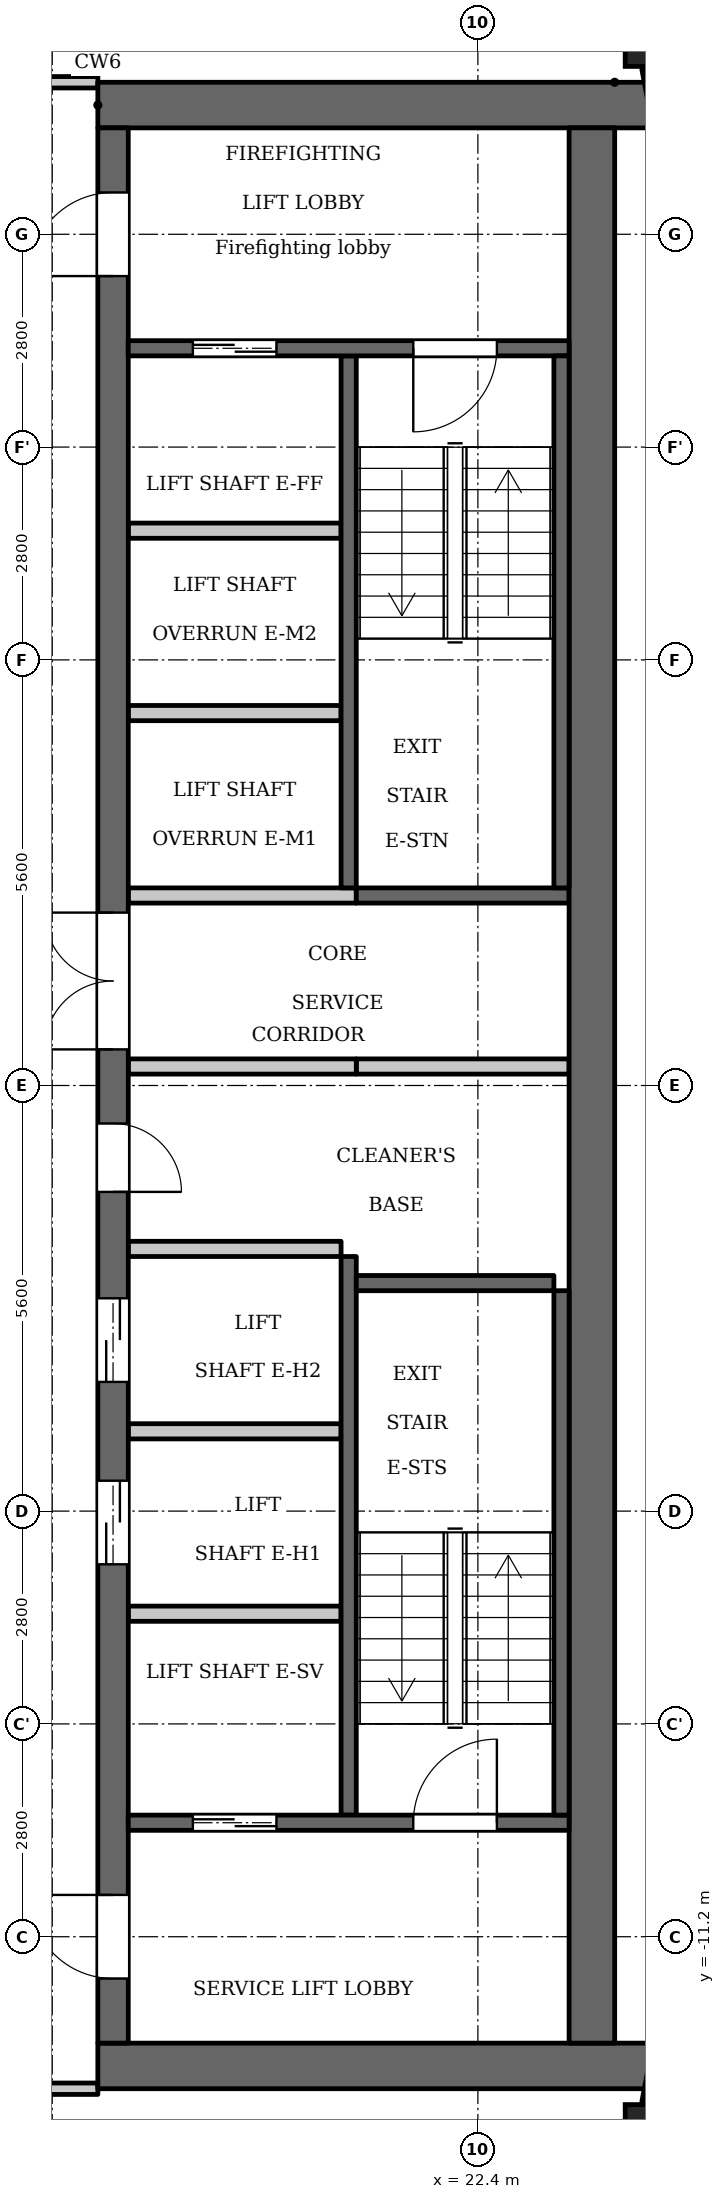
"""IFC4 building model, lengths in metres.
Left out: names, types, materials, properties, quantities, classifications, styles, units other than length and angle.
Written with IfcOpenShell. Run it as: python <this file> out.ifc"""

import sys

from ifc_helpers import new_model, si_unit, direction, frame, frame_2d, origin, origin_2d, place, context, subcontext, project, spatial, rectangle, extrude, element, fill, save


model = new_model("IFC4")
c1 = context("Model", 3, precision=1e-05, world=origin(), true_north=direction((0.0, 1.0)))
c2 = subcontext(c1, "Body", "Model", "MODEL_VIEW")
j1 = project(units=[si_unit("LENGTHUNIT", "METRE"), si_unit("PLANEANGLEUNIT", "RADIAN")], contexts=[c1])
p1 = place(None, origin())
s1 = spatial("IfcSite", under=j1, at=p1, CompositionType="ELEMENT")
p2 = place(p1, origin())
s2 = spatial("IfcBuilding", under=s1, at=p2, CompositionType="ELEMENT")
p3 = place(p2, frame((0.0, 0.0, 245.2)))
s3 = spatial("IfcBuildingStorey", under=s2, at=p3, CompositionType="ELEMENT", Elevation=245.2)
for number, where, z_axis, x_axis in (
    (1, (24.738, -13.809, 0.0), (0.0, 0.0, 1.0), (1.0, 0.0, 0.0)),
    (2, (24.738, 13.809, 0.0), (0.0, 0.0, 1.0), (1.0, 0.0, 0.0)),
):
    element("IfcColumn", number, at=place(p3, frame(where, z_axis=z_axis, x_axis=x_axis)), inside=s3, PredefinedType="COLUMN", context=c2, shape_type="SweptSolid", body=[
        extrude(rectangle(XDim=0.8, YDim=0.8, at=origin_2d()), origin(), (0.0, 0.0, 1.0), 3.5),
    ])
for number, where, z_axis, x_axis in (
    (3, (24.705, -13.395, 0.0), (0.0, 0.0, 1.0), (0.187, 0.982, 0.0)),
    (4, (25.053, 11.572, 0.0), (0.0, 0.0, 1.0), (-0.187, 0.982, 0.0)),
):
    element("IfcWall", number, at=place(p3, frame(where, z_axis=z_axis, x_axis=x_axis)), inside=s3, PredefinedType="SOLIDWALL", context=c2, shape_type="SweptSolid", body=[
        extrude(rectangle(XDim=1.856, YDim=0.3, at=frame_2d((0.928, 0.0))), origin(), (0.0, 0.0, 1.0), 2.55),
    ])
p4 = place(p3, frame((20.7, 2.6, 0.0), z_axis=(0.0, 0.0, 1.0), x_axis=(0.0, 1.0, 0.0)))
e5 = element("IfcWall", 5, at=p4, inside=s3, PredefinedType="SHEAR", context=c2, shape_type="SweptSolid", body=[
    extrude(rectangle(XDim=7.0, YDim=0.2, at=frame_2d((3.5, 0.0))), origin(), (0.0, 0.0, 1.0), 3.2),
])
p5 = place(p3, frame((20.7, -9.6, 0.0), z_axis=(0.0, 0.0, 1.0), x_axis=(0.0, 1.0, 0.0)))
e6 = element("IfcWall", 6, at=p5, inside=s3, PredefinedType="SHEAR", context=c2, shape_type="SweptSolid", body=[
    extrude(rectangle(XDim=7.35, YDim=0.2, at=frame_2d((3.675, 0.0))), origin(), (0.0, 0.0, 1.0), 3.2),
])
p6 = place(p3, frame((20.8, 2.5, 0.0), z_axis=(0.0, 0.0, 1.0), x_axis=(1.0, 0.0, 0.0)))
e7 = element("IfcWall", 7, at=p6, inside=s3, PredefinedType="SHEAR", context=c2, shape_type="SweptSolid", body=[
    extrude(rectangle(XDim=2.8, YDim=0.2, at=frame_2d((1.4, 0.0))), origin(), (0.0, 0.0, 1.0), 3.2),
])
p7 = place(p3, frame((20.8, 0.25, 0.0), z_axis=(0.0, 0.0, 1.0), x_axis=(1.0, 0.0, 0.0)))
e8 = element("IfcWall", 8, at=p7, inside=s3, PredefinedType="PARTITIONING", context=c2, shape_type="SweptSolid", body=[
    extrude(rectangle(XDim=2.8, YDim=0.2, at=frame_2d((1.4, 0.0))), origin(), (0.0, 0.0, 1.0), 3.2),
])
for number, where, z_axis, x_axis in (
    (9, (17.4, 12.9, 0.0), (0.0, 0.0, 1.0), (1.0, 0.0, 0.0)),
    (10, (17.4, -12.9, 0.0), (0.0, 0.0, 1.0), (1.0, 0.0, 0.0)),
):
    element("IfcWall", number, at=place(p3, frame(where, z_axis=z_axis, x_axis=x_axis)), inside=s3, PredefinedType="SHEAR", context=c2, shape_type="SweptSolid", body=[
        extrude(rectangle(XDim=7.32, YDim=0.6, at=frame_2d((3.66, 0.0))), origin(), (0.0, 0.0, 1.0), 3.2),
    ])
p8 = place(p3, frame((17.6, -12.6, 0.0), z_axis=(0.0, 0.0, 1.0), x_axis=(0.0, 1.0, 0.0)))
e11 = element("IfcWall", 11, at=p8, inside=s3, PredefinedType="SHEAR", context=c2, shape_type="SweptSolid", body=[
    extrude(rectangle(XDim=25.2, YDim=0.4, at=frame_2d((12.6, 0.0))), origin(), (0.0, 0.0, 1.0), 3.2),
])
p9 = place(p8, frame((6.3, 0.0, 0.0)))
e12 = element("IfcOpeningElement", 12, at=p9, cuts=e11, PredefinedType="OPENING", context=c2, shape_type="SweptSolid", body=[
    extrude(rectangle(XDim=1.1, YDim=2.1, at=frame_2d((0.55, 1.05))), frame((0.0, 0.21, 0.0), z_axis=(0.0, -1.0, 0.0), x_axis=(1.0, 0.0, 0.0)), (0.0, 0.0, 1.0), 0.42),
])
p10 = place(p8, frame((8.7, 0.0, 0.0)))
e13 = element("IfcOpeningElement", 13, at=p10, cuts=e11, PredefinedType="OPENING", context=c2, shape_type="SweptSolid", body=[
    extrude(rectangle(XDim=1.1, YDim=2.1, at=frame_2d((0.55, 1.05))), frame((0.0, 0.21, 0.0), z_axis=(0.0, -1.0, 0.0), x_axis=(1.0, 0.0, 0.0)), (0.0, 0.0, 1.0), 0.42),
])
p11 = place(p8, frame((11.2, 0.0, 0.0)))
e14 = element("IfcOpeningElement", 14, at=p11, cuts=e11, PredefinedType="OPENING", context=c2, shape_type="SweptSolid", body=[
    extrude(rectangle(XDim=0.9, YDim=2.1, at=frame_2d((0.45, 1.05))), frame((0.0, 0.21, 0.0), z_axis=(0.0, -1.0, 0.0), x_axis=(1.0, 0.0, 0.0)), (0.0, 0.0, 1.0), 0.42),
])
p12 = place(p8, frame((23.25, 0.0, 0.0)))
e15 = element("IfcOpeningElement", 15, at=p12, cuts=e11, PredefinedType="OPENING", context=c2, shape_type="SweptSolid", body=[
    extrude(rectangle(XDim=1.1, YDim=2.1, at=frame_2d((0.55, 1.05))), frame((0.0, 0.21, 0.0), z_axis=(0.0, -1.0, 0.0), x_axis=(1.0, 0.0, 0.0)), (0.0, 0.0, 1.0), 0.42),
])
p13 = place(p8, frame((0.85, 0.0, 0.0)))
e16 = element("IfcOpeningElement", 16, at=p13, cuts=e11, PredefinedType="OPENING", context=c2, shape_type="SweptSolid", body=[
    extrude(rectangle(XDim=1.1, YDim=2.1, at=frame_2d((0.55, 1.05))), frame((0.0, 0.21, 0.0), z_axis=(0.0, -1.0, 0.0), x_axis=(1.0, 0.0, 0.0)), (0.0, 0.0, 1.0), 0.42),
])
p14 = place(p8, frame((13.075, 0.0, 0.0)))
e17 = element("IfcOpeningElement", 17, at=p14, cuts=e11, PredefinedType="OPENING", context=c2, shape_type="SweptSolid", body=[
    extrude(rectangle(XDim=1.8, YDim=2.1, at=frame_2d((0.9, 1.05))), frame((0.0, 0.21, 0.0), z_axis=(0.0, -1.0, 0.0), x_axis=(1.0, 0.0, 0.0)), (0.0, 0.0, 1.0), 0.42),
])
p15 = place(p3, frame((23.9, -12.6, 0.0), z_axis=(0.0, 0.0, 1.0), x_axis=(0.0, 1.0, 0.0)))
e18 = element("IfcWall", 18, at=p15, inside=s3, PredefinedType="SHEAR", context=c2, shape_type="SweptSolid", body=[
    extrude(rectangle(XDim=25.2, YDim=0.6, at=frame_2d((12.6, 0.0))), origin(), (0.0, 0.0, 1.0), 3.2),
])
p16 = place(p3, frame((17.8, -9.7, 0.0), z_axis=(0.0, 0.0, 1.0), x_axis=(1.0, 0.0, 0.0)))
e19 = element("IfcWall", 19, at=p16, inside=s3, PredefinedType="SHEAR", context=c2, shape_type="SweptSolid", body=[
    extrude(rectangle(XDim=5.8, YDim=0.2, at=frame_2d((2.9, 0.0))), origin(), (0.0, 0.0, 1.0), 3.2),
])
p17 = place(p16, frame((0.85, 0.0, 0.0)))
e20 = element("IfcOpeningElement", 20, at=p17, cuts=e19, PredefinedType="OPENING", context=c2, shape_type="SweptSolid", body=[
    extrude(rectangle(XDim=1.1, YDim=2.1, at=frame_2d((0.55, 1.05))), frame((0.0, 0.11, 0.0), z_axis=(0.0, -1.0, 0.0), x_axis=(1.0, 0.0, 0.0)), (0.0, 0.0, 1.0), 0.22),
])
p18 = place(p16, frame((3.75, 0.0, 0.0)))
e21 = element("IfcOpeningElement", 21, at=p18, cuts=e19, PredefinedType="OPENING", context=c2, shape_type="SweptSolid", body=[
    extrude(rectangle(XDim=1.1, YDim=2.1, at=frame_2d((0.55, 1.05))), frame((0.0, 0.11, 0.0), z_axis=(0.0, -1.0, 0.0), x_axis=(1.0, 0.0, 0.0)), (0.0, 0.0, 1.0), 0.22),
])
for number, where, z_axis, x_axis in (
    (22, (17.8, -6.95, 0.0), (0.0, 0.0, 1.0), (1.0, 0.0, 0.0)),
    (23, (17.8, -4.55, 0.0), (0.0, 0.0, 1.0), (1.0, 0.0, 0.0)),
    (24, (17.8, -2.15, 0.0), (0.0, 0.0, 1.0), (1.0, 0.0, 0.0)),
):
    element("IfcWall", number, at=place(p3, frame(where, z_axis=z_axis, x_axis=x_axis)), inside=s3, PredefinedType="PARTITIONING", context=c2, shape_type="SweptSolid", body=[
        extrude(rectangle(XDim=2.8, YDim=0.2, at=frame_2d((1.4, 0.0))), origin(), (0.0, 0.0, 1.0), 3.2),
    ])
for number, where, z_axis, x_axis in (
    (25, (17.8, 0.25, 0.0), (0.0, 0.0, 1.0), (1.0, 0.0, 0.0)),
    (26, (17.8, 2.5, 0.0), (0.0, 0.0, 1.0), (1.0, 0.0, 0.0)),
):
    element("IfcWall", number, at=place(p3, frame(where, z_axis=z_axis, x_axis=x_axis)), inside=s3, PredefinedType="PARTITIONING", context=c2, shape_type="SweptSolid", body=[
        extrude(rectangle(XDim=3.0, YDim=0.2, at=frame_2d((1.5, 0.0))), origin(), (0.0, 0.0, 1.0), 3.2),
    ])
for number, where, z_axis, x_axis in (
    (27, (17.8, 4.9, 0.0), (0.0, 0.0, 1.0), (1.0, 0.0, 0.0)),
    (28, (17.8, 7.3, 0.0), (0.0, 0.0, 1.0), (1.0, 0.0, 0.0)),
):
    element("IfcWall", number, at=place(p3, frame(where, z_axis=z_axis, x_axis=x_axis)), inside=s3, PredefinedType="PARTITIONING", context=c2, shape_type="SweptSolid", body=[
        extrude(rectangle(XDim=2.8, YDim=0.2, at=frame_2d((1.4, 0.0))), origin(), (0.0, 0.0, 1.0), 3.2),
    ])
p19 = place(p3, frame((17.8, 9.7, 0.0), z_axis=(0.0, 0.0, 1.0), x_axis=(1.0, 0.0, 0.0)))
e29 = element("IfcWall", 29, at=p19, inside=s3, PredefinedType="SHEAR", context=c2, shape_type="SweptSolid", body=[
    extrude(rectangle(XDim=5.8, YDim=0.2, at=frame_2d((2.9, 0.0))), origin(), (0.0, 0.0, 1.0), 3.2),
])
p20 = place(p19, frame((0.85, 0.0, 0.0)))
e30 = element("IfcOpeningElement", 30, at=p20, cuts=e29, PredefinedType="OPENING", context=c2, shape_type="SweptSolid", body=[
    extrude(rectangle(XDim=1.1, YDim=2.1, at=frame_2d((0.55, 1.05))), frame((0.0, 0.11, 0.0), z_axis=(0.0, -1.0, 0.0), x_axis=(1.0, 0.0, 0.0)), (0.0, 0.0, 1.0), 0.22),
])
p21 = place(p19, frame((3.75, 0.0, 0.0)))
e31 = element("IfcOpeningElement", 31, at=p21, cuts=e29, PredefinedType="OPENING", context=c2, shape_type="SweptSolid", body=[
    extrude(rectangle(XDim=1.1, YDim=2.1, at=frame_2d((0.55, 1.05))), frame((0.0, 0.11, 0.0), z_axis=(0.0, -1.0, 0.0), x_axis=(1.0, 0.0, 0.0)), (0.0, 0.0, 1.0), 0.22),
])
p22 = place(p3, frame((23.5, 2.6, 0.0), z_axis=(0.0, 0.0, 1.0), x_axis=(0.0, 1.0, 0.0)))
e32 = element("IfcWall", 32, at=p22, inside=s3, PredefinedType="SHEAR", context=c2, shape_type="SweptSolid", body=[
    extrude(rectangle(XDim=7.0, YDim=0.2, at=frame_2d((3.5, 0.0))), origin(), (0.0, 0.0, 1.0), 3.2),
])
p23 = place(p3, frame((23.5, -9.6, 0.0), z_axis=(0.0, 0.0, 1.0), x_axis=(0.0, 1.0, 0.0)))
e33 = element("IfcWall", 33, at=p23, inside=s3, PredefinedType="SHEAR", context=c2, shape_type="SweptSolid", body=[
    extrude(rectangle(XDim=6.9, YDim=0.2, at=frame_2d((3.45, 0.0))), origin(), (0.0, 0.0, 1.0), 3.2),
])
p24 = place(p3, frame((20.8, -2.6, 0.0), z_axis=(0.0, 0.0, 1.0), x_axis=(1.0, 0.0, 0.0)))
e34 = element("IfcWall", 34, at=p24, inside=s3, PredefinedType="SHEAR", context=c2, shape_type="SweptSolid", body=[
    extrude(rectangle(XDim=2.6, YDim=0.2, at=frame_2d((1.3, 0.0))), origin(), (0.0, 0.0, 1.0), 3.2),
])
p25 = place(p3, frame((15.075, -13.2, 0.0), z_axis=(0.0, 0.0, 1.0), x_axis=(1.0, 0.0, 0.0)))
e35 = element("IfcWall", 35, at=p25, inside=s3, PredefinedType="PARTITIONING", context=c2, shape_type="SweptSolid", body=[
    extrude(rectangle(XDim=2.325, YDim=0.15, at=frame_2d((1.163, 0.0))), origin(), (0.0, 0.0, 1.0), 3.2),
])
p26 = place(p25, frame((0.575, 0.0, 0.0)))
e36 = element("IfcOpeningElement", 36, at=p26, cuts=e35, PredefinedType="OPENING", context=c2, shape_type="SweptSolid", body=[
    extrude(rectangle(XDim=1.0, YDim=2.1, at=frame_2d((0.5, 1.05))), frame((0.0, 0.085, 0.0), z_axis=(0.0, -1.0, 0.0), x_axis=(1.0, 0.0, 0.0)), (0.0, 0.0, 1.0), 0.17),
])
p27 = place(p3, frame((15.075, 13.2, 0.0), z_axis=(0.0, 0.0, 1.0), x_axis=(1.0, 0.0, 0.0)))
e37 = element("IfcWall", 37, at=p27, inside=s3, PredefinedType="PARTITIONING", context=c2, shape_type="SweptSolid", body=[
    extrude(rectangle(XDim=2.325, YDim=0.15, at=frame_2d((1.163, 0.0))), origin(), (0.0, 0.0, 1.0), 3.2),
])
p28 = place(p27, frame((0.675, 0.0, 0.0)))
e38 = element("IfcOpeningElement", 38, at=p28, cuts=e37, PredefinedType="OPENING", context=c2, shape_type="SweptSolid", body=[
    extrude(rectangle(XDim=1.0, YDim=2.1, at=frame_2d((0.5, 1.05))), frame((0.0, 0.085, 0.0), z_axis=(0.0, -1.0, 0.0), x_axis=(1.0, 0.0, 0.0)), (0.0, 0.0, 1.0), 0.17),
])
p29 = place(p17, origin())
e39 = element("IfcDoor", 39, at=p29, inside=s3, OperationType="DOUBLE_DOOR_SLIDING", PredefinedType="DOOR", context=c2, shape_type="SweptSolid", body=[
    extrude(rectangle(XDim=1.1, YDim=2.1, at=frame_2d((0.55, 1.05))), frame((0.0, 0.025, 0.0), z_axis=(0.0, -1.0, 0.0), x_axis=(1.0, 0.0, 0.0)), (0.0, 0.0, 1.0), 0.05),
])
fill(e20, e39)
p30 = place(p9, origin())
e40 = element("IfcDoor", 40, at=p30, inside=s3, OperationType="DOUBLE_DOOR_SLIDING", PredefinedType="DOOR", context=c2, shape_type="SweptSolid", body=[
    extrude(rectangle(XDim=1.1, YDim=2.1, at=frame_2d((0.55, 1.05))), frame((0.0, 0.025, 0.0), z_axis=(0.0, -1.0, 0.0), x_axis=(1.0, 0.0, 0.0)), (0.0, 0.0, 1.0), 0.05),
])
fill(e12, e40)
p31 = place(p10, origin())
e41 = element("IfcDoor", 41, at=p31, inside=s3, OperationType="DOUBLE_DOOR_SLIDING", PredefinedType="DOOR", context=c2, shape_type="SweptSolid", body=[
    extrude(rectangle(XDim=1.1, YDim=2.1, at=frame_2d((0.55, 1.05))), frame((0.0, 0.025, 0.0), z_axis=(0.0, -1.0, 0.0), x_axis=(1.0, 0.0, 0.0)), (0.0, 0.0, 1.0), 0.05),
])
fill(e13, e41)
p32 = place(p11, origin())
e42 = element("IfcDoor", 42, at=p32, inside=s3, OperationType="SINGLE_SWING_LEFT", PredefinedType="DOOR", context=c2, shape_type="SweptSolid", body=[
    extrude(rectangle(XDim=0.9, YDim=2.1, at=frame_2d((0.45, 1.05))), frame((0.0, 0.025, 0.0), z_axis=(0.0, -1.0, 0.0), x_axis=(1.0, 0.0, 0.0)), (0.0, 0.0, 1.0), 0.05),
])
fill(e14, e42)
p33 = place(p20, origin())
e43 = element("IfcDoor", 43, at=p33, inside=s3, OperationType="DOUBLE_DOOR_SLIDING", PredefinedType="DOOR", context=c2, shape_type="SweptSolid", body=[
    extrude(rectangle(XDim=1.1, YDim=2.1, at=frame_2d((0.55, 1.05))), frame((0.0, 0.025, 0.0), z_axis=(0.0, -1.0, 0.0), x_axis=(1.0, 0.0, 0.0)), (0.0, 0.0, 1.0), 0.05),
])
fill(e30, e43)
p34 = place(p12, origin())
e44 = element("IfcDoor", 44, at=p34, inside=s3, OperationType="SINGLE_SWING_RIGHT", PredefinedType="DOOR", context=c2, shape_type="SweptSolid", body=[
    extrude(rectangle(XDim=1.1, YDim=2.1, at=frame_2d((0.55, 1.05))), frame((0.0, 0.025, 0.0), z_axis=(0.0, -1.0, 0.0), x_axis=(1.0, 0.0, 0.0)), (0.0, 0.0, 1.0), 0.05),
])
fill(e15, e44)
p35 = place(p13, origin())
e45 = element("IfcDoor", 45, at=p35, inside=s3, OperationType="SINGLE_SWING_LEFT", PredefinedType="DOOR", context=c2, shape_type="SweptSolid", body=[
    extrude(rectangle(XDim=1.1, YDim=2.1, at=frame_2d((0.55, 1.05))), frame((0.0, 0.025, 0.0), z_axis=(0.0, -1.0, 0.0), x_axis=(1.0, 0.0, 0.0)), (0.0, 0.0, 1.0), 0.05),
])
fill(e16, e45)
p36 = place(p21, origin())
e46 = element("IfcDoor", 46, at=p36, inside=s3, OperationType="SINGLE_SWING_LEFT", PredefinedType="DOOR", context=c2, shape_type="SweptSolid", body=[
    extrude(rectangle(XDim=1.1, YDim=2.1, at=frame_2d((0.55, 1.05))), frame((0.0, 0.025, 0.0), z_axis=(0.0, -1.0, 0.0), x_axis=(1.0, 0.0, 0.0)), (0.0, 0.0, 1.0), 0.05),
])
fill(e31, e46)
p37 = place(p18, origin())
e47 = element("IfcDoor", 47, at=p37, inside=s3, OperationType="SINGLE_SWING_LEFT", PredefinedType="DOOR", context=c2, shape_type="SweptSolid", body=[
    extrude(rectangle(XDim=1.1, YDim=2.1, at=frame_2d((0.55, 1.05))), frame((0.0, 0.025, 0.0), z_axis=(0.0, -1.0, 0.0), x_axis=(1.0, 0.0, 0.0)), (0.0, 0.0, 1.0), 0.05),
])
fill(e21, e47)
p38 = place(p14, origin())
e48 = element("IfcDoor", 48, at=p38, inside=s3, OperationType="DOUBLE_DOOR_SINGLE_SWING", PredefinedType="DOOR", context=c2, shape_type="SweptSolid", body=[
    extrude(rectangle(XDim=1.8, YDim=2.1, at=frame_2d((0.9, 1.05))), frame((0.0, 0.025, 0.0), z_axis=(0.0, -1.0, 0.0), x_axis=(1.0, 0.0, 0.0)), (0.0, 0.0, 1.0), 0.05),
])
fill(e17, e48)
save(model, sys.argv[1])
